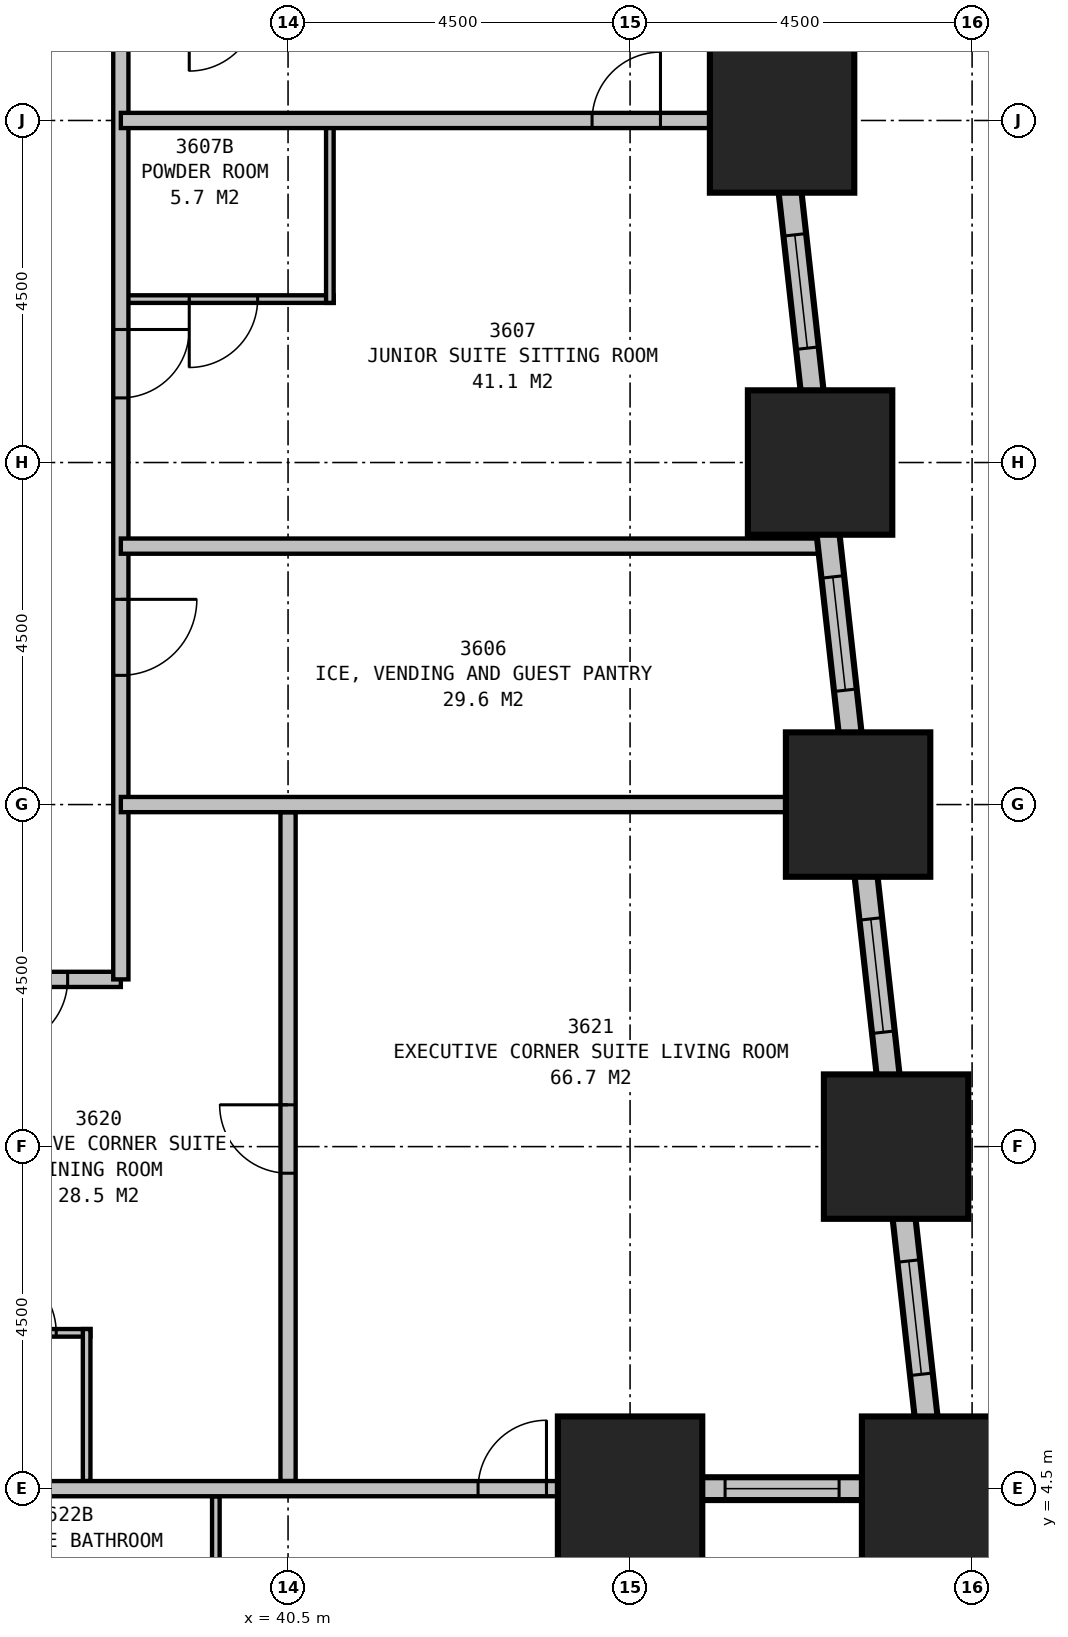
"""IFC4 building model, lengths in metres.
Left out: names, types, materials, properties, quantities, classifications, styles, units other than length and angle.
Written with IfcOpenShell. Run it as: python <this file> out.ifc"""

import sys

from ifc_helpers import new_model, si_unit, direction, frame, frame_2d, origin, origin_2d, place, context, subcontext, project, spatial, rectangle, extrude, element, fill, save


model = new_model("IFC4")
c1 = context("Model", 3, precision=1e-05, world=origin(), true_north=direction((0.0, 1.0)))
c2 = subcontext(c1, "Body", "Model", "MODEL_VIEW")
j1 = project(units=[si_unit("LENGTHUNIT", "METRE"), si_unit("PLANEANGLEUNIT", "RADIAN")], contexts=[c1])
p1 = place(None, origin())
s1 = spatial("IfcSite", under=j1, at=p1, CompositionType="ELEMENT")
p2 = place(p1, origin())
s2 = spatial("IfcBuilding", under=s1, at=p2, CompositionType="ELEMENT")
p3 = place(p2, frame((0.0, 0.0, 138.9)))
s3 = spatial("IfcBuildingStorey", under=s2, at=p3, CompositionType="ELEMENT", Elevation=138.9)
for number, where, z_axis, x_axis in (
    (1, (45.0, 4.5, 0.0), (0.0, 0.0, 1.0), (1.0, 0.0, 0.0)),
    (2, (49.0, 4.5, 0.0), (0.0, 0.0, 1.0), (1.0, 0.0, 0.0)),
    (3, (48.5, 9.0, 0.0), (0.0, 0.0, 1.0), (1.0, 0.0, 0.0)),
    (4, (48.0, 13.5, 0.0), (0.0, 0.0, 1.0), (1.0, 0.0, 0.0)),
    (5, (47.5, 18.0, 0.0), (0.0, 0.0, 1.0), (1.0, 0.0, 0.0)),
    (6, (47.0, 22.5, 0.0), (0.0, 0.0, 1.0), (1.0, 0.0, 0.0)),
):
    element("IfcColumn", number, at=place(p3, frame(where, z_axis=z_axis, x_axis=x_axis)), inside=s3, PredefinedType="COLUMN", context=c2, shape_type="SweptSolid", body=[
        extrude(rectangle(XDim=1.9, YDim=1.9, at=origin_2d()), origin(), (0.0, 0.0, 1.0), 3.5),
    ])
p4 = place(p3, frame((45.0, -0.15, 0.0), z_axis=(0.0, 0.0, 1.0), x_axis=(0.0, 1.0, 0.0)))
e7 = element("IfcWall", 7, at=p4, inside=s3, PredefinedType="STANDARD", context=c2, shape_type="SweptSolid", body=[
    extrude(rectangle(XDim=4.8, YDim=0.3, at=frame_2d((2.4, 0.0))), origin(), (0.0, 0.0, 1.0), 2.15),
])
p5 = place(p4, frame((1.65, 0.0, 0.5)))
e8 = element("IfcOpeningElement", 8, at=p5, cuts=e7, PredefinedType="OPENING", context=c2, shape_type="SweptSolid", body=[
    extrude(rectangle(XDim=1.5, YDim=1.5, at=frame_2d((0.75, 0.75))), frame((0.0, 0.16, 0.0), z_axis=(0.0, -1.0, 0.0), x_axis=(1.0, 0.0, 0.0)), (0.0, 0.0, 1.0), 0.32),
])
p6 = place(p3, frame((44.85, 4.5, 0.0), z_axis=(0.0, 0.0, 1.0), x_axis=(1.0, 0.0, 0.0)))
e9 = element("IfcWall", 9, at=p6, inside=s3, PredefinedType="STANDARD", context=c2, shape_type="SweptSolid", body=[
    extrude(rectangle(XDim=4.3, YDim=0.3, at=frame_2d((2.15, 0.0))), origin(), (0.0, 0.0, 1.0), 2.15),
])
p7 = place(p6, frame((1.4, 0.0, 0.5)))
e10 = element("IfcOpeningElement", 10, at=p7, cuts=e9, PredefinedType="OPENING", context=c2, shape_type="SweptSolid", body=[
    extrude(rectangle(XDim=1.5, YDim=1.5, at=frame_2d((0.75, 0.75))), frame((0.0, 0.16, 0.0), z_axis=(0.0, -1.0, 0.0), x_axis=(1.0, 0.0, 0.0)), (0.0, 0.0, 1.0), 0.32),
])
p8 = place(p3, frame((49.017, 4.351, 0.0), z_axis=(0.0, 0.0, 1.0), x_axis=(-0.110433201132, 0.993883548555, 0.0)))
e11 = element("IfcWall", 11, at=p8, inside=s3, PredefinedType="STANDARD", context=c2, shape_type="SweptSolid", body=[
    extrude(rectangle(XDim=31.994, YDim=0.3, at=frame_2d((15.997, 0.0))), origin(), (0.0, 0.0, 1.0), 2.15),
])
p9 = place(p8, frame((1.664, 0.0, 0.5)))
e12 = element("IfcOpeningElement", 12, at=p9, cuts=e11, PredefinedType="OPENING", context=c2, shape_type="SweptSolid", body=[
    extrude(rectangle(XDim=1.5, YDim=1.5, at=frame_2d((0.75, 0.75))), frame((0.0, 0.16, 0.0), z_axis=(0.0, -1.0, 0.0), x_axis=(1.0, 0.0, 0.0)), (0.0, 0.0, 1.0), 0.32),
])
p10 = place(p8, frame((6.192, 0.0, 0.5)))
e13 = element("IfcOpeningElement", 13, at=p10, cuts=e11, PredefinedType="OPENING", context=c2, shape_type="SweptSolid", body=[
    extrude(rectangle(XDim=1.5, YDim=1.5, at=frame_2d((0.75, 0.75))), frame((0.0, 0.16, 0.0), z_axis=(0.0, -1.0, 0.0), x_axis=(1.0, 0.0, 0.0)), (0.0, 0.0, 1.0), 0.32),
])
p11 = place(p8, frame((10.719, 0.0, 0.5)))
e14 = element("IfcOpeningElement", 14, at=p11, cuts=e11, PredefinedType="OPENING", context=c2, shape_type="SweptSolid", body=[
    extrude(rectangle(XDim=1.5, YDim=1.5, at=frame_2d((0.75, 0.75))), frame((0.0, 0.16, 0.0), z_axis=(0.0, -1.0, 0.0), x_axis=(1.0, 0.0, 0.0)), (0.0, 0.0, 1.0), 0.32),
])
p12 = place(p8, frame((15.247, 0.0, 0.5)))
e15 = element("IfcOpeningElement", 15, at=p12, cuts=e11, PredefinedType="OPENING", context=c2, shape_type="SweptSolid", body=[
    extrude(rectangle(XDim=1.5, YDim=1.5, at=frame_2d((0.75, 0.75))), frame((0.0, 0.16, 0.0), z_axis=(0.0, -1.0, 0.0), x_axis=(1.0, 0.0, 0.0)), (0.0, 0.0, 1.0), 0.32),
])
p13 = place(p8, frame((19.775, 0.0, 0.5)))
e16 = element("IfcOpeningElement", 16, at=p13, cuts=e11, PredefinedType="OPENING", context=c2, shape_type="SweptSolid", body=[
    extrude(rectangle(XDim=1.5, YDim=1.5, at=frame_2d((0.75, 0.75))), frame((0.0, 0.16, 0.0), z_axis=(0.0, -1.0, 0.0), x_axis=(1.0, 0.0, 0.0)), (0.0, 0.0, 1.0), 0.32),
])
p14 = place(p8, frame((24.302, 0.0, 0.5)))
e17 = element("IfcOpeningElement", 17, at=p14, cuts=e11, PredefinedType="OPENING", context=c2, shape_type="SweptSolid", body=[
    extrude(rectangle(XDim=1.5, YDim=1.5, at=frame_2d((0.75, 0.75))), frame((0.0, 0.16, 0.0), z_axis=(0.0, -1.0, 0.0), x_axis=(1.0, 0.0, 0.0)), (0.0, 0.0, 1.0), 0.32),
])
p15 = place(p8, frame((28.83, 0.0, 0.5)))
e18 = element("IfcOpeningElement", 18, at=p15, cuts=e11, PredefinedType="OPENING", context=c2, shape_type="SweptSolid", body=[
    extrude(rectangle(XDim=1.5, YDim=1.5, at=frame_2d((0.75, 0.75))), frame((0.0, 0.16, 0.0), z_axis=(0.0, -1.0, 0.0), x_axis=(1.0, 0.0, 0.0)), (0.0, 0.0, 1.0), 0.32),
])
p16 = place(p3, frame((11.2, 11.2, 0.0), z_axis=(0.0, 0.0, 1.0), x_axis=(1.0, 0.0, 0.0)))
e19 = element("IfcWall", 19, at=p16, inside=s3, PredefinedType="PARTITIONING", context=c2, shape_type="SweptSolid", body=[
    extrude(rectangle(XDim=27.1, YDim=0.2, at=frame_2d((13.55, 0.0))), origin(), (0.0, 0.0, 1.0), 3.25),
])
p17 = place(p16, frame((4.05, 0.0, 0.0), z_axis=(0.0, 0.0, 1.0), x_axis=(-1.0, 0.0, 0.0)))
e20 = element("IfcOpeningElement", 20, at=p17, cuts=e19, PredefinedType="OPENING", context=c2, shape_type="SweptSolid", body=[
    extrude(rectangle(XDim=0.9, YDim=2.1, at=frame_2d((0.45, 1.05))), frame((0.0, 0.11, 0.0), z_axis=(0.0, -1.0, 0.0), x_axis=(1.0, 0.0, 0.0)), (0.0, 0.0, 1.0), 0.22),
])
p18 = place(p16, frame((12.65, 0.0, 0.0), z_axis=(0.0, 0.0, 1.0), x_axis=(-1.0, 0.0, 0.0)))
e21 = element("IfcOpeningElement", 21, at=p18, cuts=e19, PredefinedType="OPENING", context=c2, shape_type="SweptSolid", body=[
    extrude(rectangle(XDim=1.0, YDim=2.1, at=frame_2d((0.5, 1.05))), frame((0.0, 0.11, 0.0), z_axis=(0.0, -1.0, 0.0), x_axis=(1.0, 0.0, 0.0)), (0.0, 0.0, 1.0), 0.22),
])
p19 = place(p16, frame((19.45, 0.0, 0.0), z_axis=(0.0, 0.0, 1.0), x_axis=(-1.0, 0.0, 0.0)))
e22 = element("IfcOpeningElement", 22, at=p19, cuts=e19, PredefinedType="OPENING", context=c2, shape_type="SweptSolid", body=[
    extrude(rectangle(XDim=0.9, YDim=2.1, at=frame_2d((0.45, 1.05))), frame((0.0, 0.11, 0.0), z_axis=(0.0, -1.0, 0.0), x_axis=(1.0, 0.0, 0.0)), (0.0, 0.0, 1.0), 0.22),
])
p20 = place(p16, frame((1.6, 0.0, 0.0), z_axis=(0.0, 0.0, 1.0), x_axis=(-1.0, 0.0, 0.0)))
e23 = element("IfcOpeningElement", 23, at=p20, cuts=e19, PredefinedType="OPENING", context=c2, shape_type="SweptSolid", body=[
    extrude(rectangle(XDim=0.9, YDim=2.1, at=frame_2d((0.45, 1.05))), frame((0.0, 0.11, 0.0), z_axis=(0.0, -1.0, 0.0), x_axis=(1.0, 0.0, 0.0)), (0.0, 0.0, 1.0), 0.22),
])
p21 = place(p16, frame((26.4, 0.0, 0.0), z_axis=(0.0, 0.0, 1.0), x_axis=(-1.0, 0.0, 0.0)))
e24 = element("IfcOpeningElement", 24, at=p21, cuts=e19, PredefinedType="OPENING", context=c2, shape_type="SweptSolid", body=[
    extrude(rectangle(XDim=0.9, YDim=2.1, at=frame_2d((0.45, 1.05))), frame((0.0, 0.11, 0.0), z_axis=(0.0, -1.0, 0.0), x_axis=(1.0, 0.0, 0.0)), (0.0, 0.0, 1.0), 0.22),
])
p22 = place(p3, frame((38.3, 11.2, 0.0), z_axis=(0.0, 0.0, 1.0), x_axis=(0.0, 1.0, 0.0)))
e25 = element("IfcWall", 25, at=p22, inside=s3, PredefinedType="PARTITIONING", context=c2, shape_type="SweptSolid", body=[
    extrude(rectangle(XDim=18.1, YDim=0.2, at=frame_2d((9.05, 0.0))), origin(), (0.0, 0.0, 1.0), 3.25),
])
p23 = place(p22, frame((5.0, 0.0, 0.0), z_axis=(0.0, 0.0, 1.0), x_axis=(-1.0, 0.0, 0.0)))
e26 = element("IfcOpeningElement", 26, at=p23, cuts=e25, PredefinedType="OPENING", context=c2, shape_type="SweptSolid", body=[
    extrude(rectangle(XDim=1.0, YDim=2.1, at=frame_2d((0.5, 1.05))), frame((0.0, 0.11, 0.0), z_axis=(0.0, -1.0, 0.0), x_axis=(1.0, 0.0, 0.0)), (0.0, 0.0, 1.0), 0.22),
])
p24 = place(p22, frame((8.55, 0.0, 0.0), z_axis=(0.0, 0.0, 1.0), x_axis=(-1.0, 0.0, 0.0)))
e27 = element("IfcOpeningElement", 27, at=p24, cuts=e25, PredefinedType="OPENING", context=c2, shape_type="SweptSolid", body=[
    extrude(rectangle(XDim=0.9, YDim=2.1, at=frame_2d((0.45, 1.05))), frame((0.0, 0.11, 0.0), z_axis=(0.0, -1.0, 0.0), x_axis=(1.0, 0.0, 0.0)), (0.0, 0.0, 1.0), 0.22),
])
p25 = place(p3, frame((38.3, 16.9, 0.0), z_axis=(0.0, 0.0, 1.0), x_axis=(1.0, 0.0, 0.0)))
e28 = element("IfcWall", 28, at=p25, inside=s3, PredefinedType="PARTITIONING", context=c2, shape_type="SweptSolid", body=[
    extrude(rectangle(XDim=9.321, YDim=0.2, at=frame_2d((4.661, 0.0))), origin(), (0.0, 0.0, 1.0), 3.25),
])
p26 = place(p3, frame((38.3, 22.5, 0.0), z_axis=(0.0, 0.0, 1.0), x_axis=(1.0, 0.0, 0.0)))
e29 = element("IfcWall", 29, at=p26, inside=s3, PredefinedType="PARTITIONING", context=c2, shape_type="SweptSolid", body=[
    extrude(rectangle(XDim=8.699, YDim=0.2, at=frame_2d((4.35, 0.0))), origin(), (0.0, 0.0, 1.0), 2.25),
])
p27 = place(p26, frame((6.2, 0.0, 0.0)))
e30 = element("IfcOpeningElement", 30, at=p27, cuts=e29, PredefinedType="OPENING", context=c2, shape_type="SweptSolid", body=[
    extrude(rectangle(XDim=0.9, YDim=2.1, at=frame_2d((0.45, 1.05))), frame((0.0, 0.11, 0.0), z_axis=(0.0, -1.0, 0.0), x_axis=(1.0, 0.0, 0.0)), (0.0, 0.0, 1.0), 0.22),
])
p28 = place(p3, frame((41.05, 20.1, 0.0), z_axis=(0.0, 0.0, 1.0), x_axis=(0.0, 1.0, 0.0)))
e31 = element("IfcWall", 31, at=p28, inside=s3, PredefinedType="PLUMBINGWALL", context=c2, shape_type="SweptSolid", body=[
    extrude(rectangle(XDim=2.4, YDim=0.1, at=frame_2d((1.2, 0.0))), origin(), (0.0, 0.0, 1.0), 3.25),
])
p29 = place(p3, frame((38.3, 20.15, 0.0), z_axis=(0.0, 0.0, 1.0), x_axis=(1.0, 0.0, 0.0)))
e32 = element("IfcWall", 32, at=p29, inside=s3, PredefinedType="PLUMBINGWALL", context=c2, shape_type="SweptSolid", body=[
    extrude(rectangle(XDim=2.8, YDim=0.1, at=frame_2d((1.4, 0.0))), origin(), (0.0, 0.0, 1.0), 3.25),
])
p30 = place(p29, frame((1.8, 0.0, 0.0), z_axis=(0.0, 0.0, 1.0), x_axis=(-1.0, 0.0, 0.0)))
e33 = element("IfcOpeningElement", 33, at=p30, cuts=e32, PredefinedType="OPENING", context=c2, shape_type="SweptSolid", body=[
    extrude(rectangle(XDim=0.9, YDim=2.1, at=frame_2d((0.45, 1.05))), frame((0.0, 0.06, 0.0), z_axis=(0.0, -1.0, 0.0), x_axis=(1.0, 0.0, 0.0)), (0.0, 0.0, 1.0), 0.12),
])
p31 = place(p3, frame((38.3, 13.5, 0.0), z_axis=(0.0, 0.0, 1.0), x_axis=(1.0, 0.0, 0.0)))
e34 = element("IfcWall", 34, at=p31, inside=s3, PredefinedType="PARTITIONING", context=c2, shape_type="SweptSolid", body=[
    extrude(rectangle(XDim=9.921, YDim=0.2, at=frame_2d((4.96, 0.0))), origin(), (0.0, 0.0, 1.0), 1.95),
])
p32 = place(p3, frame((35.9, 4.5, 0.0), z_axis=(0.0, 0.0, 1.0), x_axis=(1.0, 0.0, 0.0)))
e35 = element("IfcWall", 35, at=p32, inside=s3, PredefinedType="PARTITIONING", context=c2, shape_type="SweptSolid", body=[
    extrude(rectangle(XDim=9.1, YDim=0.2, at=frame_2d((4.55, 0.0))), origin(), (0.0, 0.0, 1.0), 3.25),
])
p33 = place(p32, frame((7.1, 0.0, 0.0)))
e36 = element("IfcOpeningElement", 36, at=p33, cuts=e35, PredefinedType="OPENING", context=c2, shape_type="SweptSolid", body=[
    extrude(rectangle(XDim=0.9, YDim=2.1, at=frame_2d((0.45, 1.05))), frame((0.0, 0.11, 0.0), z_axis=(0.0, -1.0, 0.0), x_axis=(1.0, 0.0, 0.0)), (0.0, 0.0, 1.0), 0.22),
])
p34 = place(p3, frame((40.5, 4.6, 0.0), z_axis=(0.0, 0.0, 1.0), x_axis=(0.0, 1.0, 0.0)))
e37 = element("IfcWall", 37, at=p34, inside=s3, PredefinedType="PARTITIONING", context=c2, shape_type="SweptSolid", body=[
    extrude(rectangle(XDim=8.8, YDim=0.2, at=frame_2d((4.4, 0.0))), origin(), (0.0, 0.0, 1.0), 2.25),
])
p35 = place(p34, frame((4.05, 0.0, 0.0)))
e38 = element("IfcOpeningElement", 38, at=p35, cuts=e37, PredefinedType="OPENING", context=c2, shape_type="SweptSolid", body=[
    extrude(rectangle(XDim=0.9, YDim=2.1, at=frame_2d((0.45, 1.05))), frame((0.0, 0.11, 0.0), z_axis=(0.0, -1.0, 0.0), x_axis=(1.0, 0.0, 0.0)), (0.0, 0.0, 1.0), 0.22),
])
p36 = place(p3, frame((37.85, 4.6, 0.0), z_axis=(0.0, 0.0, 1.0), x_axis=(0.0, 1.0, 0.0)))
e39 = element("IfcWall", 39, at=p36, inside=s3, PredefinedType="PLUMBINGWALL", context=c2, shape_type="SweptSolid", body=[
    extrude(rectangle(XDim=2.0, YDim=0.1, at=frame_2d((1.0, 0.0))), origin(), (0.0, 0.0, 1.0), 3.25),
])
p37 = place(p3, frame((36.1, 6.55, 0.0), z_axis=(0.0, 0.0, 1.0), x_axis=(1.0, 0.0, 0.0)))
e40 = element("IfcWall", 40, at=p37, inside=s3, PredefinedType="PLUMBINGWALL", context=c2, shape_type="SweptSolid", body=[
    extrude(rectangle(XDim=1.8, YDim=0.1, at=frame_2d((0.9, 0.0))), origin(), (0.0, 0.0, 1.0), 3.25),
])
p38 = place(p37, frame((0.45, 0.0, 0.0)))
e41 = element("IfcOpeningElement", 41, at=p38, cuts=e40, PredefinedType="OPENING", context=c2, shape_type="SweptSolid", body=[
    extrude(rectangle(XDim=0.9, YDim=2.1, at=frame_2d((0.45, 1.05))), frame((0.0, 0.06, 0.0), z_axis=(0.0, -1.0, 0.0), x_axis=(1.0, 0.0, 0.0)), (0.0, 0.0, 1.0), 0.12),
])
p39 = place(p3, frame((39.55, 4.4, 0.0), z_axis=(0.0, 0.0, 1.0), x_axis=(0.0, -1.0, 0.0)))
e42 = element("IfcWall", 42, at=p39, inside=s3, PredefinedType="PLUMBINGWALL", context=c2, shape_type="SweptSolid", body=[
    extrude(rectangle(XDim=2.3, YDim=0.1, at=frame_2d((1.15, 0.0))), origin(), (0.0, 0.0, 1.0), 3.25),
])
p40 = place(p7, origin())
e43 = element("IfcWindow", 43, at=p40, inside=s3, PartitioningType="SINGLE_PANEL", PredefinedType="WINDOW", context=c2, shape_type="SweptSolid", body=[
    extrude(rectangle(XDim=1.5, YDim=1.5, at=frame_2d((0.75, 0.75))), frame((0.0, 0.03, 0.0), z_axis=(0.0, -1.0, 0.0), x_axis=(1.0, 0.0, 0.0)), (0.0, 0.0, 1.0), 0.06),
])
fill(e10, e43)
p41 = place(p9, origin())
e44 = element("IfcWindow", 44, at=p41, inside=s3, PartitioningType="SINGLE_PANEL", PredefinedType="WINDOW", context=c2, shape_type="SweptSolid", body=[
    extrude(rectangle(XDim=1.5, YDim=1.5, at=frame_2d((0.75, 0.75))), frame((0.0, 0.03, 0.0), z_axis=(0.0, -1.0, 0.0), x_axis=(1.0, 0.0, 0.0)), (0.0, 0.0, 1.0), 0.06),
])
fill(e12, e44)
p42 = place(p10, origin())
e45 = element("IfcWindow", 45, at=p42, inside=s3, PartitioningType="SINGLE_PANEL", PredefinedType="WINDOW", context=c2, shape_type="SweptSolid", body=[
    extrude(rectangle(XDim=1.5, YDim=1.5, at=frame_2d((0.75, 0.75))), frame((0.0, 0.03, 0.0), z_axis=(0.0, -1.0, 0.0), x_axis=(1.0, 0.0, 0.0)), (0.0, 0.0, 1.0), 0.06),
])
fill(e13, e45)
p43 = place(p11, origin())
e46 = element("IfcWindow", 46, at=p43, inside=s3, PartitioningType="SINGLE_PANEL", PredefinedType="WINDOW", context=c2, shape_type="SweptSolid", body=[
    extrude(rectangle(XDim=1.5, YDim=1.5, at=frame_2d((0.75, 0.75))), frame((0.0, 0.03, 0.0), z_axis=(0.0, -1.0, 0.0), x_axis=(1.0, 0.0, 0.0)), (0.0, 0.0, 1.0), 0.06),
])
fill(e14, e46)
p44 = place(p12, origin())
e47 = element("IfcWindow", 47, at=p44, inside=s3, PartitioningType="SINGLE_PANEL", PredefinedType="WINDOW", context=c2, shape_type="SweptSolid", body=[
    extrude(rectangle(XDim=1.5, YDim=1.5, at=frame_2d((0.75, 0.75))), frame((0.0, 0.03, 0.0), z_axis=(0.0, -1.0, 0.0), x_axis=(1.0, 0.0, 0.0)), (0.0, 0.0, 1.0), 0.06),
])
fill(e15, e47)
p45 = place(p21, origin())
e48 = element("IfcDoor", 48, at=p45, inside=s3, OperationType="SINGLE_SWING_RIGHT", PredefinedType="DOOR", context=c2, shape_type="SweptSolid", body=[
    extrude(rectangle(XDim=0.9, YDim=2.1, at=frame_2d((0.45, 1.05))), frame((0.0, 0.025, 0.0), z_axis=(0.0, -1.0, 0.0), x_axis=(1.0, 0.0, 0.0)), (0.0, 0.0, 1.0), 0.05),
])
fill(e24, e48)
p46 = place(p23, origin())
e49 = element("IfcDoor", 49, at=p46, inside=s3, OperationType="SINGLE_SWING_LEFT", PredefinedType="DOOR", context=c2, shape_type="SweptSolid", body=[
    extrude(rectangle(XDim=1.0, YDim=2.1, at=frame_2d((0.5, 1.05))), frame((0.0, 0.025, 0.0), z_axis=(0.0, -1.0, 0.0), x_axis=(1.0, 0.0, 0.0)), (0.0, 0.0, 1.0), 0.05),
])
fill(e26, e49)
p47 = place(p24, origin())
e50 = element("IfcDoor", 50, at=p47, inside=s3, OperationType="SINGLE_SWING_LEFT", PredefinedType="DOOR", context=c2, shape_type="SweptSolid", body=[
    extrude(rectangle(XDim=0.9, YDim=2.1, at=frame_2d((0.45, 1.05))), frame((0.0, 0.025, 0.0), z_axis=(0.0, -1.0, 0.0), x_axis=(1.0, 0.0, 0.0)), (0.0, 0.0, 1.0), 0.05),
])
fill(e27, e50)
p48 = place(p27, origin())
e51 = element("IfcDoor", 51, at=p48, inside=s3, OperationType="SINGLE_SWING_RIGHT", PredefinedType="DOOR", context=c2, shape_type="SweptSolid", body=[
    extrude(rectangle(XDim=0.9, YDim=2.1, at=frame_2d((0.45, 1.05))), frame((0.0, 0.025, 0.0), z_axis=(0.0, -1.0, 0.0), x_axis=(1.0, 0.0, 0.0)), (0.0, 0.0, 1.0), 0.05),
])
fill(e30, e51)
p49 = place(p30, origin())
e52 = element("IfcDoor", 52, at=p49, inside=s3, OperationType="SINGLE_SWING_RIGHT", PredefinedType="DOOR", context=c2, shape_type="SweptSolid", body=[
    extrude(rectangle(XDim=0.9, YDim=2.1, at=frame_2d((0.45, 1.05))), frame((0.0, 0.025, 0.0), z_axis=(0.0, -1.0, 0.0), x_axis=(1.0, 0.0, 0.0)), (0.0, 0.0, 1.0), 0.05),
])
fill(e33, e52)
p50 = place(p33, origin())
e53 = element("IfcDoor", 53, at=p50, inside=s3, OperationType="SINGLE_SWING_RIGHT", PredefinedType="DOOR", context=c2, shape_type="SweptSolid", body=[
    extrude(rectangle(XDim=0.9, YDim=2.1, at=frame_2d((0.45, 1.05))), frame((0.0, 0.025, 0.0), z_axis=(0.0, -1.0, 0.0), x_axis=(1.0, 0.0, 0.0)), (0.0, 0.0, 1.0), 0.05),
])
fill(e36, e53)
p51 = place(p35, origin())
e54 = element("IfcDoor", 54, at=p51, inside=s3, OperationType="SINGLE_SWING_RIGHT", PredefinedType="DOOR", context=c2, shape_type="SweptSolid", body=[
    extrude(rectangle(XDim=0.9, YDim=2.1, at=frame_2d((0.45, 1.05))), frame((0.0, 0.025, 0.0), z_axis=(0.0, -1.0, 0.0), x_axis=(1.0, 0.0, 0.0)), (0.0, 0.0, 1.0), 0.05),
])
fill(e38, e54)
p52 = place(p38, origin())
e55 = element("IfcDoor", 55, at=p52, inside=s3, OperationType="SINGLE_SWING_LEFT", PredefinedType="DOOR", context=c2, shape_type="SweptSolid", body=[
    extrude(rectangle(XDim=0.9, YDim=2.1, at=frame_2d((0.45, 1.05))), frame((0.0, 0.025, 0.0), z_axis=(0.0, -1.0, 0.0), x_axis=(1.0, 0.0, 0.0)), (0.0, 0.0, 1.0), 0.05),
])
fill(e41, e55)
save(model, sys.argv[1])
